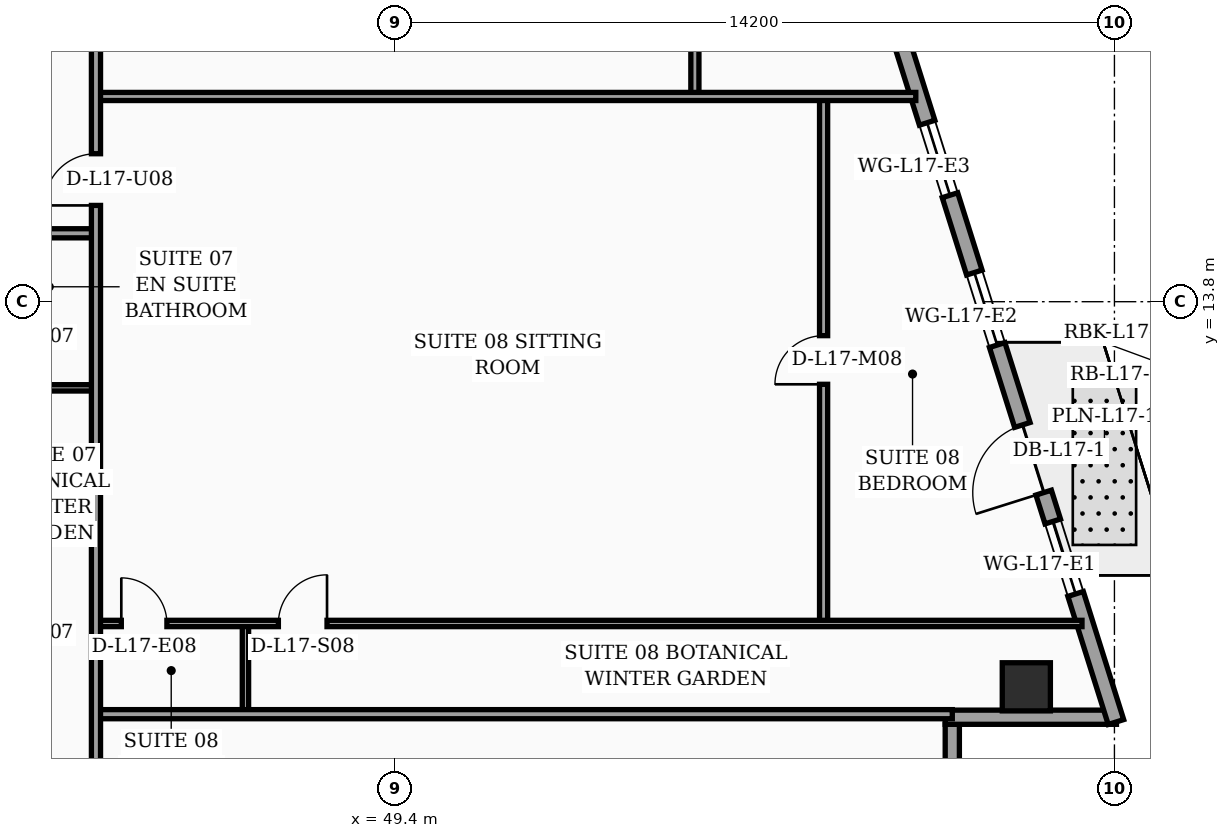
"""IFC4 building model, lengths in metres.
Left out: names, types, materials, properties, quantities, classifications, styles, units other than length and angle.
Written with IfcOpenShell. Run it as: python <this file> out.ifc"""

import sys

from ifc_helpers import new_model, si_unit, direction, frame, frame_2d, origin, origin_2d, place, context, subcontext, project, spatial, rectangle, hollow_rectangle, extrude, element, fill, save


model = new_model("IFC4")
c1 = context("Model", 3, precision=1e-05, world=origin(), true_north=direction((0.0, 1.0)))
c2 = subcontext(c1, "Body", "Model", "MODEL_VIEW")
j1 = project(units=[si_unit("LENGTHUNIT", "METRE"), si_unit("PLANEANGLEUNIT", "RADIAN")], contexts=[c1])
p1 = place(None, origin())
s1 = spatial("IfcSite", under=j1, at=p1, CompositionType="ELEMENT")
p2 = place(p1, origin())
s2 = spatial("IfcBuilding", under=s1, at=p2, CompositionType="ELEMENT")
p3 = place(p2, frame((0.0, 0.0, 73.6)))
s3 = spatial("IfcBuildingStorey", under=s2, at=p3, CompositionType="ELEMENT", Elevation=73.6)
p4 = place(p3, frame((61.861, 6.2, 0.0), z_axis=(0.0, 0.0, 1.0), x_axis=(1.0, 0.0, 0.0)))
e1 = element("IfcColumn", 1, at=p4, inside=s3, PredefinedType="COLUMN", context=c2, shape_type="SweptSolid", body=[
    extrude(hollow_rectangle(XDim=0.95, YDim=0.95, WallThickness=0.04, at=origin_2d()), origin(), (0.0, 0.0, 1.0), 3.56),
])
p5 = place(p3, frame((60.4, 2.52, 0.0), z_axis=(0.0, 0.0, 1.0), x_axis=(0.0, 1.0, 0.0)))
e2 = element("IfcWall", 2, at=p5, inside=s3, PredefinedType="SOLIDWALL", context=c2, shape_type="SweptSolid", body=[
    extrude(rectangle(XDim=2.94, YDim=0.28, at=frame_2d((1.47, 0.0))), origin(), (0.0, 0.0, 1.0), 3.04),
])
p6 = place(p3, frame((60.26, 5.6, 0.0), z_axis=(0.0, 0.0, 1.0), x_axis=(1.0, 0.0, 0.0)))
e3 = element("IfcWall", 3, at=p6, inside=s3, PredefinedType="SOLIDWALL", context=c2, shape_type="SweptSolid", body=[
    extrude(rectangle(XDim=3.38, YDim=0.28, at=frame_2d((1.69, 0.0))), origin(), (0.0, 0.0, 1.0), 3.04),
])
p7 = place(p3, frame((63.63, 5.505, 0.0), z_axis=(0.0, 0.0, 1.0), x_axis=(-0.300501856448, 0.953781229775, 0.0)))
e4 = element("IfcWall", 4, at=p7, inside=s3, PredefinedType="SOLIDWALL", context=c2, shape_type="SweptSolid", body=[
    extrude(rectangle(XDim=30.814, YDim=0.32, at=frame_2d((15.407, 0.0))), origin(), (0.0, 0.0, 1.0), 3.56),
])
p8 = place(p7, frame((4.747, 0.0, 0.0)))
e5 = element("IfcOpeningElement", 5, at=p8, cuts=e4, PredefinedType="OPENING", context=c2, shape_type="SweptSolid", body=[
    extrude(rectangle(XDim=1.4, YDim=2.25, at=frame_2d((0.7, 1.125))), frame((0.0, 0.17, 0.0), z_axis=(0.0, -1.0, 0.0), x_axis=(1.0, 0.0, 0.0)), (0.0, 0.0, 1.0), 0.34),
])
p9 = place(p7, frame((2.65, 0.0, 0.75)))
e6 = element("IfcOpeningElement", 6, at=p9, cuts=e4, PredefinedType="OPENING", context=c2, shape_type="SweptSolid", body=[
    extrude(rectangle(XDim=1.5, YDim=1.6, at=frame_2d((0.75, 0.8))), frame((0.0, 0.17, 0.0), z_axis=(0.0, -1.0, 0.0), x_axis=(1.0, 0.0, 0.0)), (0.0, 0.0, 1.0), 0.34),
])
p10 = place(p7, frame((7.8, 0.0, 0.75)))
e7 = element("IfcOpeningElement", 7, at=p10, cuts=e4, PredefinedType="OPENING", context=c2, shape_type="SweptSolid", body=[
    extrude(rectangle(XDim=1.5, YDim=1.6, at=frame_2d((0.75, 0.8))), frame((0.0, 0.17, 0.0), z_axis=(0.0, -1.0, 0.0), x_axis=(1.0, 0.0, 0.0)), (0.0, 0.0, 1.0), 0.34),
])
p11 = place(p7, frame((10.9, 0.0, 0.75)))
e8 = element("IfcOpeningElement", 8, at=p11, cuts=e4, PredefinedType="OPENING", context=c2, shape_type="SweptSolid", body=[
    extrude(rectangle(XDim=1.5, YDim=1.6, at=frame_2d((0.75, 0.8))), frame((0.0, 0.17, 0.0), z_axis=(0.0, -1.0, 0.0), x_axis=(1.0, 0.0, 0.0)), (0.0, 0.0, 1.0), 0.34),
])
p12 = place(p7, frame((14.0, 0.0, 0.75)))
e9 = element("IfcOpeningElement", 9, at=p12, cuts=e4, PredefinedType="OPENING", context=c2, shape_type="SweptSolid", body=[
    extrude(rectangle(XDim=1.5, YDim=1.6, at=frame_2d((0.75, 0.8))), frame((0.0, 0.17, 0.0), z_axis=(0.0, -1.0, 0.0), x_axis=(1.0, 0.0, 0.0)), (0.0, 0.0, 1.0), 0.34),
])
p13 = place(p7, frame((17.1, 0.0, 0.75)))
e10 = element("IfcOpeningElement", 10, at=p13, cuts=e4, PredefinedType="OPENING", context=c2, shape_type="SweptSolid", body=[
    extrude(rectangle(XDim=1.5, YDim=1.6, at=frame_2d((0.75, 0.8))), frame((0.0, 0.17, 0.0), z_axis=(0.0, -1.0, 0.0), x_axis=(1.0, 0.0, 0.0)), (0.0, 0.0, 1.0), 0.34),
])
p14 = place(p7, frame((23.3, 0.0, 0.75)))
e11 = element("IfcOpeningElement", 11, at=p14, cuts=e4, PredefinedType="OPENING", context=c2, shape_type="SweptSolid", body=[
    extrude(rectangle(XDim=1.5, YDim=1.6, at=frame_2d((0.75, 0.8))), frame((0.0, 0.17, 0.0), z_axis=(0.0, -1.0, 0.0), x_axis=(1.0, 0.0, 0.0)), (0.0, 0.0, 1.0), 0.34),
])
p15 = place(p7, frame((27.45, 0.0, 0.75)))
e12 = element("IfcOpeningElement", 12, at=p15, cuts=e4, PredefinedType="OPENING", context=c2, shape_type="SweptSolid", body=[
    extrude(rectangle(XDim=1.5, YDim=1.6, at=frame_2d((0.75, 0.8))), frame((0.0, 0.17, 0.0), z_axis=(0.0, -1.0, 0.0), x_axis=(1.0, 0.0, 0.0)), (0.0, 0.0, 1.0), 0.34),
])
p16 = place(p3, frame((41.57, 12.1, 0.0), z_axis=(0.0, 0.0, 1.0), x_axis=(1.0, 0.0, 0.0)))
e13 = element("IfcWall", 13, at=p16, inside=s3, PredefinedType="PARTITIONING", context=c2, shape_type="SweptSolid", body=[
    extrude(rectangle(XDim=1.93, YDim=0.125, at=frame_2d((0.965, 0.0))), origin(), (0.0, 0.0, 1.0), 3.56),
])
p17 = place(p3, frame((32.4, 15.15, 0.0), z_axis=(0.0, 0.0, 1.0), x_axis=(1.0, 0.0, 0.0)))
e14 = element("IfcWall", 14, at=p17, inside=s3, PredefinedType="PARTITIONING", context=c2, shape_type="SweptSolid", body=[
    extrude(rectangle(XDim=11.1, YDim=0.18, at=frame_2d((5.55, 0.0))), origin(), (0.0, 0.0, 1.0), 2.84),
])
p18 = place(p17, frame((0.98, 0.0, 0.0)))
e15 = element("IfcOpeningElement", 15, at=p18, cuts=e14, PredefinedType="OPENING", context=c2, shape_type="SweptSolid", body=[
    extrude(rectangle(XDim=1.02, YDim=2.2, at=frame_2d((0.51, 1.1))), frame((0.0, 0.1, 0.0), z_axis=(0.0, -1.0, 0.0), x_axis=(1.0, 0.0, 0.0)), (0.0, 0.0, 1.0), 0.2),
])
p19 = place(p17, frame((6.43, 0.0, 0.0)))
e16 = element("IfcOpeningElement", 16, at=p19, cuts=e14, PredefinedType="OPENING", context=c2, shape_type="SweptSolid", body=[
    extrude(rectangle(XDim=1.02, YDim=2.2, at=frame_2d((0.51, 1.1))), frame((0.0, 0.1, 0.0), z_axis=(0.0, -1.0, 0.0), x_axis=(1.0, 0.0, 0.0)), (0.0, 0.0, 1.0), 0.2),
])
p20 = place(p3, frame((46.45, 5.66, 0.0), z_axis=(0.0, 0.0, 1.0), x_axis=(0.0, 1.0, 0.0)))
e17 = element("IfcWall", 17, at=p20, inside=s3, PredefinedType="PARTITIONING", context=c2, shape_type="SweptSolid", body=[
    extrude(rectangle(XDim=1.79, YDim=0.125, at=frame_2d((0.895, 0.0))), origin(), (0.0, 0.0, 1.0), 3.56),
])
p21 = place(p3, frame((57.86, 7.45, 0.0), z_axis=(0.0, 0.0, 1.0), x_axis=(0.0, 1.0, 0.0)))
e18 = element("IfcWall", 18, at=p21, inside=s3, PredefinedType="PARTITIONING", context=c2, shape_type="SweptSolid", body=[
    extrude(rectangle(XDim=10.4, YDim=0.16, at=frame_2d((5.2, 0.0))), origin(), (0.0, 0.0, 1.0), 3.04),
])
p22 = place(p21, frame((4.72, 0.0, 0.0)))
e19 = element("IfcOpeningElement", 19, at=p22, cuts=e18, PredefinedType="OPENING", context=c2, shape_type="SweptSolid", body=[
    extrude(rectangle(XDim=0.96, YDim=2.2, at=frame_2d((0.48, 1.1))), frame((0.0, 0.09, 0.0), z_axis=(0.0, -1.0, 0.0), x_axis=(1.0, 0.0, 0.0)), (0.0, 0.0, 1.0), 0.18),
])
p23 = place(p3, frame((43.5, 7.45, 0.0), z_axis=(0.0, 0.0, 1.0), x_axis=(1.0, 0.0, 0.0)))
e20 = element("IfcWall", 20, at=p23, inside=s3, PredefinedType="PARTITIONING", context=c2, shape_type="SweptSolid", body=[
    extrude(rectangle(XDim=19.46, YDim=0.125, at=frame_2d((9.73, 0.0))), origin(), (0.0, 0.0, 1.0), 2.84),
])
p24 = place(p23, frame((0.5, 0.0, 0.0)))
e21 = element("IfcOpeningElement", 21, at=p24, cuts=e20, PredefinedType="OPENING", context=c2, shape_type="SweptSolid", body=[
    extrude(rectangle(XDim=0.9, YDim=2.15, at=frame_2d((0.45, 1.075))), frame((0.0, 0.073, 0.0), z_axis=(0.0, -1.0, 0.0), x_axis=(1.0, 0.0, 0.0)), (0.0, 0.0, 1.0), 0.145),
])
p25 = place(p23, frame((3.6, 0.0, 0.0)))
e22 = element("IfcOpeningElement", 22, at=p25, cuts=e20, PredefinedType="OPENING", context=c2, shape_type="SweptSolid", body=[
    extrude(rectangle(XDim=0.96, YDim=2.2, at=frame_2d((0.48, 1.1))), frame((0.0, 0.073, 0.0), z_axis=(0.0, -1.0, 0.0), x_axis=(1.0, 0.0, 0.0)), (0.0, 0.0, 1.0), 0.145),
])
p26 = place(p3, frame((43.5, 5.66, 0.0), z_axis=(0.0, 0.0, 1.0), x_axis=(1.0, 0.0, 0.0)))
e23 = element("IfcWall", 23, at=p26, inside=s3, PredefinedType="PARTITIONING", context=c2, shape_type="SweptSolid", body=[
    extrude(rectangle(XDim=16.9, YDim=0.18, at=frame_2d((8.45, 0.0))), origin(), (0.0, 0.0, 1.0), 2.84),
])
p27 = place(p3, frame((55.32, 17.85, 0.0), z_axis=(0.0, 0.0, 1.0), x_axis=(0.0, 1.0, 0.0)))
e24 = element("IfcWall", 24, at=p27, inside=s3, PredefinedType="PARTITIONING", context=c2, shape_type="SweptSolid", body=[
    extrude(rectangle(XDim=5.74, YDim=0.16, at=frame_2d((2.87, 0.0))), origin(), (0.0, 0.0, 1.0), 2.84),
])
p28 = place(p27, frame((2.39, 0.0, 0.0)))
e25 = element("IfcOpeningElement", 25, at=p28, cuts=e24, PredefinedType="OPENING", context=c2, shape_type="SweptSolid", body=[
    extrude(rectangle(XDim=0.96, YDim=2.2, at=frame_2d((0.48, 1.1))), frame((0.0, 0.09, 0.0), z_axis=(0.0, -1.0, 0.0), x_axis=(1.0, 0.0, 0.0)), (0.0, 0.0, 1.0), 0.18),
])
p29 = place(p3, frame((43.5, 17.85, 0.0), z_axis=(0.0, 0.0, 1.0), x_axis=(1.0, 0.0, 0.0)))
e26 = element("IfcWall", 26, at=p29, inside=s3, PredefinedType="PARTITIONING", context=c2, shape_type="SweptSolid", body=[
    extrude(rectangle(XDim=16.18, YDim=0.16, at=frame_2d((8.09, 0.0))), origin(), (0.0, 0.0, 1.0), 2.84),
])
p30 = place(p3, frame((43.5, 2.44, 0.0), z_axis=(0.0, 0.0, 1.0), x_axis=(0.0, 1.0, 0.0)))
e27 = element("IfcWall", 27, at=p30, inside=s3, PredefinedType="PARTITIONING", context=c2, shape_type="SweptSolid", body=[
    extrude(rectangle(XDim=31.04, YDim=0.18, at=frame_2d((15.52, 0.0))), origin(), (0.0, 0.0, 1.0), 2.84),
])
p31 = place(p30, frame((13.26, 0.0, 0.0)))
e28 = element("IfcOpeningElement", 28, at=p31, cuts=e27, PredefinedType="OPENING", context=c2, shape_type="SweptSolid", body=[
    extrude(rectangle(XDim=1.02, YDim=2.2, at=frame_2d((0.51, 1.1))), frame((0.0, 0.1, 0.0), z_axis=(0.0, -1.0, 0.0), x_axis=(1.0, 0.0, 0.0)), (0.0, 0.0, 1.0), 0.2),
])
p32 = place(p30, frame((17.77, 0.0, 0.0)))
e29 = element("IfcOpeningElement", 29, at=p32, cuts=e27, PredefinedType="OPENING", context=c2, shape_type="SweptSolid", body=[
    extrude(rectangle(XDim=1.02, YDim=2.2, at=frame_2d((0.51, 1.1))), frame((0.0, 0.1, 0.0), z_axis=(0.0, -1.0, 0.0), x_axis=(1.0, 0.0, 0.0)), (0.0, 0.0, 1.0), 0.2),
])
p33 = place(p30, frame((25.58, 0.0, 0.0)))
e30 = element("IfcOpeningElement", 30, at=p33, cuts=e27, PredefinedType="OPENING", context=c2, shape_type="SweptSolid", body=[
    extrude(rectangle(XDim=1.02, YDim=2.2, at=frame_2d((0.51, 1.1))), frame((0.0, 0.1, 0.0), z_axis=(0.0, -1.0, 0.0), x_axis=(1.0, 0.0, 0.0)), (0.0, 0.0, 1.0), 0.2),
])
p34 = place(p8, origin())
e31 = element("IfcDoor", 31, at=p34, inside=s3, OperationType="SINGLE_SWING_LEFT", PredefinedType="DOOR", context=c2, shape_type="SweptSolid", body=[
    extrude(rectangle(XDim=1.4, YDim=2.25, at=frame_2d((0.7, 1.125))), frame((0.0, 0.025, 0.0), z_axis=(0.0, -1.0, 0.0), x_axis=(1.0, 0.0, 0.0)), (0.0, 0.0, 1.0), 0.05),
])
fill(e5, e31)
p35 = place(p9, origin())
e32 = element("IfcWindow", 32, at=p35, inside=s3, PartitioningType="SINGLE_PANEL", PredefinedType="WINDOW", context=c2, shape_type="SweptSolid", body=[
    extrude(rectangle(XDim=1.5, YDim=1.6, at=frame_2d((0.75, 0.8))), frame((0.0, 0.03, 0.0), z_axis=(0.0, -1.0, 0.0), x_axis=(1.0, 0.0, 0.0)), (0.0, 0.0, 1.0), 0.06),
])
fill(e6, e32)
p36 = place(p10, origin())
e33 = element("IfcWindow", 33, at=p36, inside=s3, PartitioningType="SINGLE_PANEL", PredefinedType="WINDOW", context=c2, shape_type="SweptSolid", body=[
    extrude(rectangle(XDim=1.5, YDim=1.6, at=frame_2d((0.75, 0.8))), frame((0.0, 0.03, 0.0), z_axis=(0.0, -1.0, 0.0), x_axis=(1.0, 0.0, 0.0)), (0.0, 0.0, 1.0), 0.06),
])
fill(e7, e33)
p37 = place(p11, origin())
e34 = element("IfcWindow", 34, at=p37, inside=s3, PartitioningType="SINGLE_PANEL", PredefinedType="WINDOW", context=c2, shape_type="SweptSolid", body=[
    extrude(rectangle(XDim=1.5, YDim=1.6, at=frame_2d((0.75, 0.8))), frame((0.0, 0.03, 0.0), z_axis=(0.0, -1.0, 0.0), x_axis=(1.0, 0.0, 0.0)), (0.0, 0.0, 1.0), 0.06),
])
fill(e8, e34)
p38 = place(p22, origin())
e35 = element("IfcDoor", 35, at=p38, inside=s3, OperationType="SINGLE_SWING_LEFT", PredefinedType="DOOR", context=c2, shape_type="SweptSolid", body=[
    extrude(rectangle(XDim=0.96, YDim=2.2, at=frame_2d((0.48, 1.1))), frame((0.0, 0.025, 0.0), z_axis=(0.0, -1.0, 0.0), x_axis=(1.0, 0.0, 0.0)), (0.0, 0.0, 1.0), 0.05),
])
fill(e19, e35)
p39 = place(p24, origin())
e36 = element("IfcDoor", 36, at=p39, inside=s3, OperationType="SINGLE_SWING_LEFT", PredefinedType="DOOR", context=c2, shape_type="SweptSolid", body=[
    extrude(rectangle(XDim=0.9, YDim=2.15, at=frame_2d((0.45, 1.075))), frame((0.0, 0.025, 0.0), z_axis=(0.0, -1.0, 0.0), x_axis=(1.0, 0.0, 0.0)), (0.0, 0.0, 1.0), 0.05),
])
fill(e21, e36)
p40 = place(p25, origin())
e37 = element("IfcDoor", 37, at=p40, inside=s3, OperationType="SINGLE_SWING_RIGHT", PredefinedType="DOOR", context=c2, shape_type="SweptSolid", body=[
    extrude(rectangle(XDim=0.96, YDim=2.2, at=frame_2d((0.48, 1.1))), frame((0.0, 0.025, 0.0), z_axis=(0.0, -1.0, 0.0), x_axis=(1.0, 0.0, 0.0)), (0.0, 0.0, 1.0), 0.05),
])
fill(e22, e37)
p41 = place(p31, origin())
e38 = element("IfcDoor", 38, at=p41, inside=s3, OperationType="SINGLE_SWING_LEFT", PredefinedType="DOOR", context=c2, shape_type="SweptSolid", body=[
    extrude(rectangle(XDim=1.02, YDim=2.2, at=frame_2d((0.51, 1.1))), frame((0.0, 0.025, 0.0), z_axis=(0.0, -1.0, 0.0), x_axis=(1.0, 0.0, 0.0)), (0.0, 0.0, 1.0), 0.05),
])
fill(e28, e38)
save(model, sys.argv[1])
